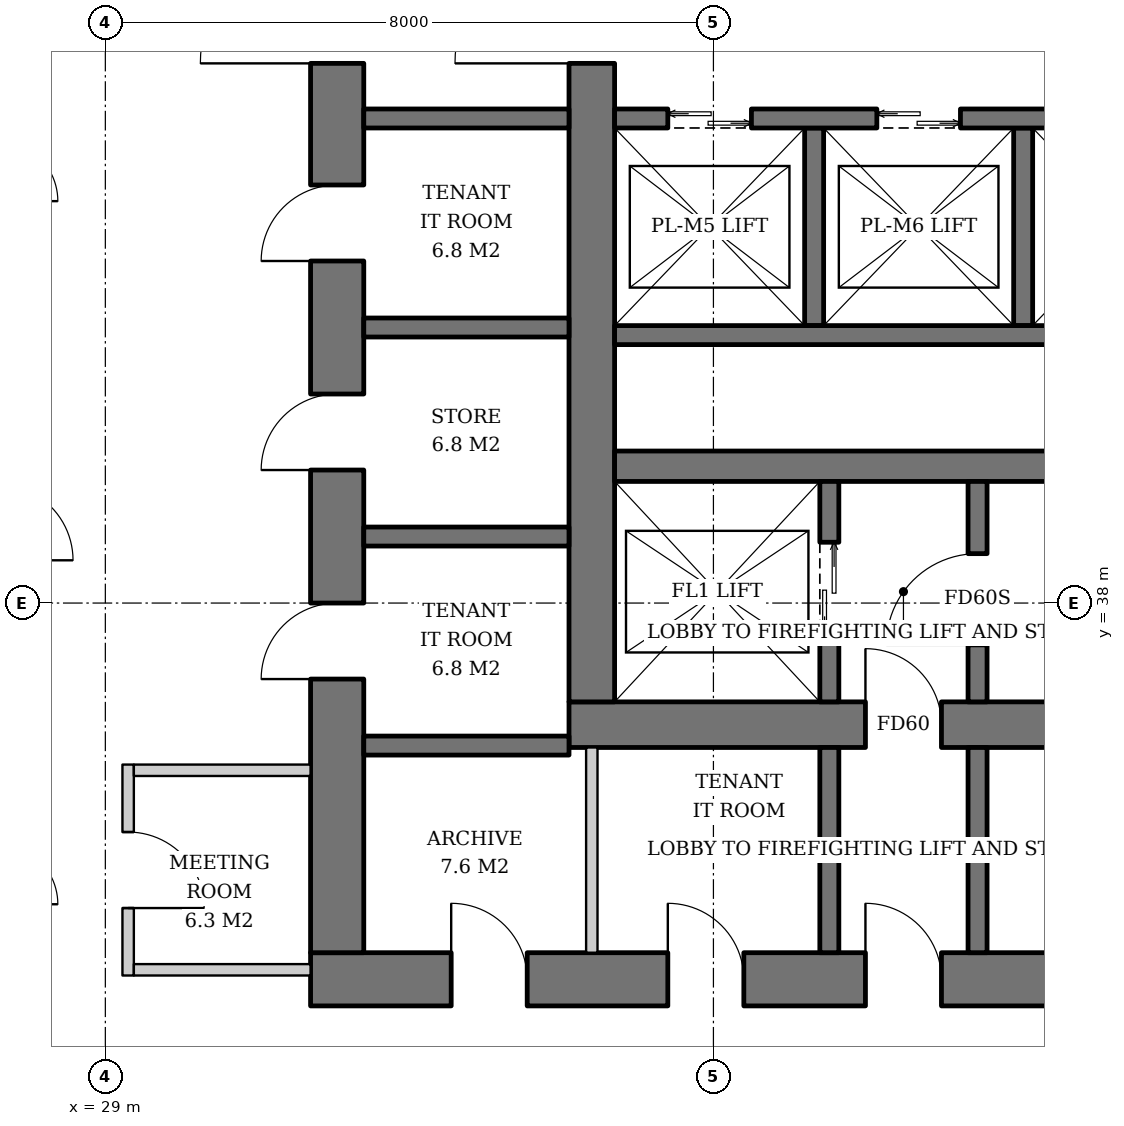
"""IFC4 building model, lengths in metres.
Left out: names, types, materials, properties, quantities, classifications, styles, units other than length and angle.
Written with IfcOpenShell. Run it as: python <this file> out.ifc"""

import sys

from ifc_helpers import new_model, si_unit, direction, frame, frame_2d, origin, place, context, subcontext, project, spatial, rectangle, extrude, element, fill, save


model = new_model("IFC4")
c1 = context("Model", 3, precision=1e-05, world=origin(), true_north=direction((0.0, 1.0)))
c2 = subcontext(c1, "Body", "Model", "MODEL_VIEW")
j1 = project(units=[si_unit("LENGTHUNIT", "METRE"), si_unit("PLANEANGLEUNIT", "RADIAN")], contexts=[c1])
p1 = place(None, origin())
s1 = spatial("IfcSite", under=j1, at=p1, CompositionType="ELEMENT")
p2 = place(p1, origin())
s2 = spatial("IfcBuilding", under=s1, at=p2, CompositionType="ELEMENT")
p3 = place(p2, frame((0.0, 0.0, 142.6)))
s3 = spatial("IfcBuildingStorey", under=s2, at=p3, CompositionType="ELEMENT", Elevation=142.6)
p4 = place(p3, frame((35.1, 36.4, 0.0), z_axis=(0.0, 0.0, 1.0), x_axis=(1.0, 0.0, 0.0)))
e1 = element("IfcWall", 1, at=p4, inside=s3, PredefinedType="SHEAR", context=c2, shape_type="SweptSolid", body=[
    extrude(rectangle(XDim=19.8, YDim=0.6, at=frame_2d((9.9, 0.0))), origin(), (0.0, 0.0, 1.0), 3.8),
])
p5 = place(p4, frame((3.9, 0.0, 0.0)))
e2 = element("IfcOpeningElement", 2, at=p5, cuts=e1, PredefinedType="OPENING", context=c2, shape_type="SweptSolid", body=[
    extrude(rectangle(XDim=1.0, YDim=2.1, at=frame_2d((0.5, 1.05))), frame((0.0, 0.31, 0.0), z_axis=(0.0, -1.0, 0.0), x_axis=(1.0, 0.0, 0.0)), (0.0, 0.0, 1.0), 0.62),
])
p6 = place(p4, frame((15.35, 0.0, 0.0)))
e3 = element("IfcOpeningElement", 3, at=p6, cuts=e1, PredefinedType="OPENING", context=c2, shape_type="SweptSolid", body=[
    extrude(rectangle(XDim=1.0, YDim=2.1, at=frame_2d((0.5, 1.05))), frame((0.0, 0.31, 0.0), z_axis=(0.0, -1.0, 0.0), x_axis=(1.0, 0.0, 0.0)), (0.0, 0.0, 1.0), 0.62),
])
p7 = place(p3, frame((35.4, 36.7, 0.0), z_axis=(0.0, 0.0, 1.0), x_axis=(0.0, 1.0, 0.0)))
e4 = element("IfcWall", 4, at=p7, inside=s3, PredefinedType="SHEAR", context=c2, shape_type="SweptSolid", body=[
    extrude(rectangle(XDim=18.6, YDim=0.6, at=frame_2d((9.3, 0.0))), origin(), (0.0, 0.0, 1.0), 3.8),
])
p8 = place(p7, frame((8.4, 0.0, 0.0)))
e5 = element("IfcOpeningElement", 5, at=p8, cuts=e4, PredefinedType="OPENING", context=c2, shape_type="SweptSolid", body=[
    extrude(rectangle(XDim=1.8, YDim=2.4, at=frame_2d((0.9, 1.2))), frame((0.0, 0.31, 0.0), z_axis=(0.0, -1.0, 0.0), x_axis=(1.0, 0.0, 0.0)), (0.0, 0.0, 1.0), 0.62),
])
p9 = place(p3, frame((31.7, 33.05, 0.0), z_axis=(0.0, 0.0, 1.0), x_axis=(1.0, 0.0, 0.0)))
e6 = element("IfcWall", 6, at=p9, inside=s3, PredefinedType="SHEAR", context=c2, shape_type="SweptSolid", body=[
    extrude(rectangle(XDim=26.6, YDim=0.7, at=frame_2d((13.3, 0.0))), origin(), (0.0, 0.0, 1.0), 3.8),
])
p10 = place(p9, frame((7.3, 0.0, 0.0)))
e7 = element("IfcOpeningElement", 7, at=p10, cuts=e6, PredefinedType="OPENING", context=c2, shape_type="SweptSolid", body=[
    extrude(rectangle(XDim=1.0, YDim=2.1, at=frame_2d((0.5, 1.05))), frame((0.0, 0.36, 0.0), z_axis=(0.0, -1.0, 0.0), x_axis=(1.0, 0.0, 0.0)), (0.0, 0.0, 1.0), 0.72),
])
p11 = place(p9, frame((18.75, 0.0, 0.0)))
e8 = element("IfcOpeningElement", 8, at=p11, cuts=e6, PredefinedType="OPENING", context=c2, shape_type="SweptSolid", body=[
    extrude(rectangle(XDim=1.0, YDim=2.1, at=frame_2d((0.5, 1.05))), frame((0.0, 0.36, 0.0), z_axis=(0.0, -1.0, 0.0), x_axis=(1.0, 0.0, 0.0)), (0.0, 0.0, 1.0), 0.72),
])
p12 = place(p9, frame((1.85, 0.0, 0.0)))
e9 = element("IfcOpeningElement", 9, at=p12, cuts=e6, PredefinedType="OPENING", context=c2, shape_type="SweptSolid", body=[
    extrude(rectangle(XDim=1.0, YDim=2.1, at=frame_2d((0.5, 1.05))), frame((0.0, 0.36, 0.0), z_axis=(0.0, -1.0, 0.0), x_axis=(1.0, 0.0, 0.0)), (0.0, 0.0, 1.0), 0.72),
])
p13 = place(p9, frame((4.7, 0.0, 0.0)))
e10 = element("IfcOpeningElement", 10, at=p13, cuts=e6, PredefinedType="OPENING", context=c2, shape_type="SweptSolid", body=[
    extrude(rectangle(XDim=1.0, YDim=2.1, at=frame_2d((0.5, 1.05))), frame((0.0, 0.36, 0.0), z_axis=(0.0, -1.0, 0.0), x_axis=(1.0, 0.0, 0.0)), (0.0, 0.0, 1.0), 0.72),
])
p14 = place(p9, frame((12.44, 0.0, 0.0)))
e11 = element("IfcOpeningElement", 11, at=p14, cuts=e6, PredefinedType="OPENING", context=c2, shape_type="SweptSolid", body=[
    extrude(rectangle(XDim=1.0, YDim=2.1, at=frame_2d((0.5, 1.05))), frame((0.0, 0.36, 0.0), z_axis=(0.0, -1.0, 0.0), x_axis=(1.0, 0.0, 0.0)), (0.0, 0.0, 1.0), 0.72),
])
p15 = place(p9, frame((20.644, 0.0, 0.0)))
e12 = element("IfcOpeningElement", 12, at=p15, cuts=e6, PredefinedType="OPENING", context=c2, shape_type="SweptSolid", body=[
    extrude(rectangle(XDim=1.0, YDim=2.1, at=frame_2d((0.5, 1.05))), frame((0.0, 0.36, 0.0), z_axis=(0.0, -1.0, 0.0), x_axis=(1.0, 0.0, 0.0)), (0.0, 0.0, 1.0), 0.72),
])
p16 = place(p9, frame((23.544, 0.0, 0.0)))
e13 = element("IfcOpeningElement", 13, at=p16, cuts=e6, PredefinedType="OPENING", context=c2, shape_type="SweptSolid", body=[
    extrude(rectangle(XDim=1.0, YDim=2.1, at=frame_2d((0.5, 1.05))), frame((0.0, 0.36, 0.0), z_axis=(0.0, -1.0, 0.0), x_axis=(1.0, 0.0, 0.0)), (0.0, 0.0, 1.0), 0.72),
])
p17 = place(p3, frame((32.05, 33.4, 0.0), z_axis=(0.0, 0.0, 1.0), x_axis=(0.0, 1.0, 0.0)))
e14 = element("IfcWall", 14, at=p17, inside=s3, PredefinedType="SHEAR", context=c2, shape_type="SweptSolid", body=[
    extrude(rectangle(XDim=25.2, YDim=0.7, at=frame_2d((12.6, 0.0))), origin(), (0.0, 0.0, 1.0), 3.8),
])
p18 = place(p17, frame((11.7, 0.0, 0.0)))
e15 = element("IfcOpeningElement", 15, at=p18, cuts=e14, PredefinedType="OPENING", context=c2, shape_type="SweptSolid", body=[
    extrude(rectangle(XDim=1.8, YDim=2.4, at=frame_2d((0.9, 1.2))), frame((0.0, 0.36, 0.0), z_axis=(0.0, -1.0, 0.0), x_axis=(1.0, 0.0, 0.0)), (0.0, 0.0, 1.0), 0.72),
])
p19 = place(p17, frame((3.6, 0.0, 0.0)))
e16 = element("IfcOpeningElement", 16, at=p19, cuts=e14, PredefinedType="OPENING", context=c2, shape_type="SweptSolid", body=[
    extrude(rectangle(XDim=1.0, YDim=2.1, at=frame_2d((0.5, 1.05))), frame((0.0, 0.36, 0.0), z_axis=(0.0, -1.0, 0.0), x_axis=(1.0, 0.0, 0.0)), (0.0, 0.0, 1.0), 0.72),
])
p20 = place(p17, frame((6.35, 0.0, 0.0)))
e17 = element("IfcOpeningElement", 17, at=p20, cuts=e14, PredefinedType="OPENING", context=c2, shape_type="SweptSolid", body=[
    extrude(rectangle(XDim=1.0, YDim=2.1, at=frame_2d((0.5, 1.05))), frame((0.0, 0.36, 0.0), z_axis=(0.0, -1.0, 0.0), x_axis=(1.0, 0.0, 0.0)), (0.0, 0.0, 1.0), 0.72),
])
p21 = place(p17, frame((9.1, 0.0, 0.0)))
e18 = element("IfcOpeningElement", 18, at=p21, cuts=e14, PredefinedType="OPENING", context=c2, shape_type="SweptSolid", body=[
    extrude(rectangle(XDim=1.0, YDim=2.1, at=frame_2d((0.5, 1.05))), frame((0.0, 0.36, 0.0), z_axis=(0.0, -1.0, 0.0), x_axis=(1.0, 0.0, 0.0)), (0.0, 0.0, 1.0), 0.72),
])
p22 = place(p17, frame((15.1, 0.0, 0.0)))
e19 = element("IfcOpeningElement", 19, at=p22, cuts=e14, PredefinedType="OPENING", context=c2, shape_type="SweptSolid", body=[
    extrude(rectangle(XDim=1.0, YDim=2.1, at=frame_2d((0.5, 1.05))), frame((0.0, 0.36, 0.0), z_axis=(0.0, -1.0, 0.0), x_axis=(1.0, 0.0, 0.0)), (0.0, 0.0, 1.0), 0.72),
])
p23 = place(p17, frame((17.85, 0.0, 0.0)))
e20 = element("IfcOpeningElement", 20, at=p23, cuts=e14, PredefinedType="OPENING", context=c2, shape_type="SweptSolid", body=[
    extrude(rectangle(XDim=1.0, YDim=2.1, at=frame_2d((0.5, 1.05))), frame((0.0, 0.36, 0.0), z_axis=(0.0, -1.0, 0.0), x_axis=(1.0, 0.0, 0.0)), (0.0, 0.0, 1.0), 0.72),
])
p24 = place(p3, frame((35.7, 39.8, 0.0), z_axis=(0.0, 0.0, 1.0), x_axis=(1.0, 0.0, 0.0)))
e21 = element("IfcWall", 21, at=p24, inside=s3, PredefinedType="SHEAR", context=c2, shape_type="SweptSolid", body=[
    extrude(rectangle(XDim=18.6, YDim=0.4, at=frame_2d((9.3, 0.0))), origin(), (0.0, 0.0, 1.0), 3.8),
])
p25 = place(p3, frame((38.525, 36.7, 0.0), z_axis=(0.0, 0.0, 1.0), x_axis=(0.0, 1.0, 0.0)))
e22 = element("IfcWall", 22, at=p25, inside=s3, PredefinedType="SHEAR", context=c2, shape_type="SweptSolid", body=[
    extrude(rectangle(XDim=2.9, YDim=0.25, at=frame_2d((1.45, 0.0))), origin(), (0.0, 0.0, 1.0), 3.8),
])
p26 = place(p25, frame((0.8, 0.0, 0.0)))
e23 = element("IfcOpeningElement", 23, at=p26, cuts=e22, PredefinedType="OPENING", context=c2, shape_type="SweptSolid", body=[
    extrude(rectangle(XDim=1.3, YDim=2.2, at=frame_2d((0.65, 1.1))), frame((0.0, 0.135, 0.0), z_axis=(0.0, -1.0, 0.0), x_axis=(1.0, 0.0, 0.0)), (0.0, 0.0, 1.0), 0.27),
])
p27 = place(p3, frame((40.475, 36.7, 0.0), z_axis=(0.0, 0.0, 1.0), x_axis=(0.0, 1.0, 0.0)))
e24 = element("IfcWall", 24, at=p27, inside=s3, PredefinedType="SHEAR", context=c2, shape_type="SweptSolid", body=[
    extrude(rectangle(XDim=2.9, YDim=0.25, at=frame_2d((1.45, 0.0))), origin(), (0.0, 0.0, 1.0), 3.8),
])
p28 = place(p27, frame((0.75, 0.0, 0.0)))
e25 = element("IfcOpeningElement", 25, at=p28, cuts=e24, PredefinedType="OPENING", context=c2, shape_type="SweptSolid", body=[
    extrude(rectangle(XDim=1.2, YDim=2.1, at=frame_2d((0.6, 1.05))), frame((0.0, 0.135, 0.0), z_axis=(0.0, -1.0, 0.0), x_axis=(1.0, 0.0, 0.0)), (0.0, 0.0, 1.0), 0.27),
])
for number, where, z_axis, x_axis in (
    (26, (38.325, 44.25, 0.0), (0.0, 0.0, 1.0), (0.0, -1.0, 0.0)),
    (27, (41.075, 44.25, 0.0), (0.0, 0.0, 1.0), (0.0, -1.0, 0.0)),
):
    element("IfcWall", number, at=place(p3, frame(where, z_axis=z_axis, x_axis=x_axis)), inside=s3, PredefinedType="SHEAR", context=c2, shape_type="SweptSolid", body=[
        extrude(rectangle(XDim=2.6, YDim=0.25, at=frame_2d((1.3, 0.0))), origin(), (0.0, 0.0, 1.0), 3.8),
    ])
p29 = place(p3, frame((35.7, 41.525, 0.0), z_axis=(0.0, 0.0, 1.0), x_axis=(1.0, 0.0, 0.0)))
e28 = element("IfcWall", 28, at=p29, inside=s3, PredefinedType="SHEAR", context=c2, shape_type="SweptSolid", body=[
    extrude(rectangle(XDim=11.0, YDim=0.25, at=frame_2d((5.5, 0.0))), origin(), (0.0, 0.0, 1.0), 3.8),
])
p30 = place(p3, frame((35.7, 44.375, 0.0), z_axis=(0.0, 0.0, 1.0), x_axis=(1.0, 0.0, 0.0)))
e29 = element("IfcWall", 29, at=p30, inside=s3, PredefinedType="SHEAR", context=c2, shape_type="SweptSolid", body=[
    extrude(rectangle(XDim=12.83, YDim=0.25, at=frame_2d((6.415, 0.0))), origin(), (0.0, 0.0, 1.0), 3.8),
])
p31 = place(p30, frame((0.7, 0.0, 0.0)))
e30 = element("IfcOpeningElement", 30, at=p31, cuts=e29, PredefinedType="OPENING", context=c2, shape_type="SweptSolid", body=[
    extrude(rectangle(XDim=1.1, YDim=2.2, at=frame_2d((0.55, 1.1))), frame((0.0, 0.135, 0.0), z_axis=(0.0, -1.0, 0.0), x_axis=(1.0, 0.0, 0.0)), (0.0, 0.0, 1.0), 0.27),
])
p32 = place(p30, frame((3.45, 0.0, 0.0)))
e31 = element("IfcOpeningElement", 31, at=p32, cuts=e29, PredefinedType="OPENING", context=c2, shape_type="SweptSolid", body=[
    extrude(rectangle(XDim=1.1, YDim=2.2, at=frame_2d((0.55, 1.1))), frame((0.0, 0.135, 0.0), z_axis=(0.0, -1.0, 0.0), x_axis=(1.0, 0.0, 0.0)), (0.0, 0.0, 1.0), 0.27),
])
p33 = place(p30, frame((6.2, 0.0, 0.0)))
e32 = element("IfcOpeningElement", 32, at=p33, cuts=e29, PredefinedType="OPENING", context=c2, shape_type="SweptSolid", body=[
    extrude(rectangle(XDim=1.1, YDim=2.2, at=frame_2d((0.55, 1.1))), frame((0.0, 0.135, 0.0), z_axis=(0.0, -1.0, 0.0), x_axis=(1.0, 0.0, 0.0)), (0.0, 0.0, 1.0), 0.27),
])
p34 = place(p30, frame((8.95, 0.0, 0.0)))
e33 = element("IfcOpeningElement", 33, at=p34, cuts=e29, PredefinedType="OPENING", context=c2, shape_type="SweptSolid", body=[
    extrude(rectangle(XDim=1.1, YDim=2.2, at=frame_2d((0.55, 1.1))), frame((0.0, 0.135, 0.0), z_axis=(0.0, -1.0, 0.0), x_axis=(1.0, 0.0, 0.0)), (0.0, 0.0, 1.0), 0.27),
])
p35 = place(p30, frame((11.515, 0.0, 0.0)))
e34 = element("IfcOpeningElement", 34, at=p35, cuts=e29, PredefinedType="OPENING", context=c2, shape_type="SweptSolid", body=[
    extrude(rectangle(XDim=0.8, YDim=2.0, at=frame_2d((0.4, 1.0))), frame((0.0, 0.135, 0.0), z_axis=(0.0, -1.0, 0.0), x_axis=(1.0, 0.0, 0.0)), (0.0, 0.0, 1.0), 0.27),
])
for number, where, z_axis, x_axis in (
    (35, (32.4, 36.125, 0.0), (0.0, 0.0, 1.0), (1.0, 0.0, 0.0)),
    (36, (32.4, 38.875, 0.0), (0.0, 0.0, 1.0), (1.0, 0.0, 0.0)),
    (37, (32.4, 41.625, 0.0), (0.0, 0.0, 1.0), (1.0, 0.0, 0.0)),
    (38, (32.4, 44.375, 0.0), (0.0, 0.0, 1.0), (1.0, 0.0, 0.0)),
):
    element("IfcWall", number, at=place(p3, frame(where, z_axis=z_axis, x_axis=x_axis)), inside=s3, PredefinedType="SHEAR", context=c2, shape_type="SweptSolid", body=[
        extrude(rectangle(XDim=2.7, YDim=0.25, at=frame_2d((1.35, 0.0))), origin(), (0.0, 0.0, 1.0), 3.8),
    ])
for number, where, z_axis, x_axis in (
    (39, (38.525, 33.4, 0.0), (0.0, 0.0, 1.0), (0.0, 1.0, 0.0)),
    (40, (40.475, 33.4, 0.0), (0.0, 0.0, 1.0), (0.0, 1.0, 0.0)),
):
    element("IfcWall", number, at=place(p3, frame(where, z_axis=z_axis, x_axis=x_axis)), inside=s3, PredefinedType="SOLIDWALL", context=c2, shape_type="SweptSolid", body=[
        extrude(rectangle(XDim=2.7, YDim=0.25, at=frame_2d((1.35, 0.0))), origin(), (0.0, 0.0, 1.0), 3.62),
    ])
p36 = place(p3, frame((35.4, 33.4, 0.0), z_axis=(0.0, 0.0, 1.0), x_axis=(0.0, 1.0, 0.0)))
e41 = element("IfcWall", 41, at=p36, inside=s3, PredefinedType="SOLIDWALL", context=c2, shape_type="SweptSolid", body=[
    extrude(rectangle(XDim=2.7, YDim=0.15, at=frame_2d((1.35, 0.0))), origin(), (0.0, 0.0, 1.0), 3.62),
])
p37 = place(p3, frame((29.3, 35.875, 0.0), z_axis=(0.0, 0.0, 1.0), x_axis=(0.0, -1.0, 0.0)))
e42 = element("IfcWall", 42, at=p37, inside=s3, PredefinedType="PARTITIONING", context=c2, shape_type="SweptSolid", body=[
    extrude(rectangle(XDim=2.775, YDim=0.15, at=frame_2d((1.387, 0.0))), origin(), (0.0, 0.0, 1.0), 2.806),
])
p38 = place(p37, frame((0.887, 0.0, 0.0)))
e43 = element("IfcOpeningElement", 43, at=p38, cuts=e42, PredefinedType="OPENING", context=c2, shape_type="SweptSolid", body=[
    extrude(rectangle(XDim=1.0, YDim=2.1, at=frame_2d((0.5, 1.05))), frame((0.0, 0.085, 0.0), z_axis=(0.0, -1.0, 0.0), x_axis=(1.0, 0.0, 0.0)), (0.0, 0.0, 1.0), 0.17),
])
for number, where, z_axis, x_axis in (
    (44, (31.7, 35.8, 0.0), (0.0, 0.0, 1.0), (-1.0, 0.0, 0.0)),
    (45, (31.7, 33.175, 0.0), (0.0, 0.0, 1.0), (-1.0, 0.0, 0.0)),
):
    element("IfcWall", number, at=place(p3, frame(where, z_axis=z_axis, x_axis=x_axis)), inside=s3, PredefinedType="PARTITIONING", context=c2, shape_type="SweptSolid", body=[
        extrude(rectangle(XDim=2.325, YDim=0.15, at=frame_2d((1.163, 0.0))), origin(), (0.0, 0.0, 1.0), 3.62),
    ])
p39 = place(p26, origin())
e46 = element("IfcDoor", 46, at=p39, inside=s3, OperationType="DOUBLE_DOOR_SLIDING", PredefinedType="DOOR", context=c2, shape_type="SweptSolid", body=[
    extrude(rectangle(XDim=1.3, YDim=2.2, at=frame_2d((0.65, 1.1))), frame((0.0, 0.025, 0.0), z_axis=(0.0, -1.0, 0.0), x_axis=(1.0, 0.0, 0.0)), (0.0, 0.0, 1.0), 0.05),
])
fill(e23, e46)
p40 = place(p28, origin())
e47 = element("IfcDoor", 47, at=p40, inside=s3, OperationType="SINGLE_SWING_LEFT", PredefinedType="DOOR", context=c2, shape_type="SweptSolid", body=[
    extrude(rectangle(XDim=1.2, YDim=2.1, at=frame_2d((0.6, 1.05))), frame((0.0, 0.025, 0.0), z_axis=(0.0, -1.0, 0.0), x_axis=(1.0, 0.0, 0.0)), (0.0, 0.0, 1.0), 0.05),
])
fill(e25, e47)
p41 = place(p31, origin())
e48 = element("IfcDoor", 48, at=p41, inside=s3, OperationType="DOUBLE_DOOR_SLIDING", PredefinedType="DOOR", context=c2, shape_type="SweptSolid", body=[
    extrude(rectangle(XDim=1.1, YDim=2.2, at=frame_2d((0.55, 1.1))), frame((0.0, 0.025, 0.0), z_axis=(0.0, -1.0, 0.0), x_axis=(1.0, 0.0, 0.0)), (0.0, 0.0, 1.0), 0.05),
])
fill(e30, e48)
p42 = place(p32, origin())
e49 = element("IfcDoor", 49, at=p42, inside=s3, OperationType="DOUBLE_DOOR_SLIDING", PredefinedType="DOOR", context=c2, shape_type="SweptSolid", body=[
    extrude(rectangle(XDim=1.1, YDim=2.2, at=frame_2d((0.55, 1.1))), frame((0.0, 0.025, 0.0), z_axis=(0.0, -1.0, 0.0), x_axis=(1.0, 0.0, 0.0)), (0.0, 0.0, 1.0), 0.05),
])
fill(e31, e49)
p43 = place(p5, origin())
e50 = element("IfcDoor", 50, at=p43, inside=s3, OperationType="SINGLE_SWING_LEFT", PredefinedType="DOOR", context=c2, shape_type="SweptSolid", body=[
    extrude(rectangle(XDim=1.0, YDim=2.1, at=frame_2d((0.5, 1.05))), frame((0.0, 0.025, 0.0), z_axis=(0.0, -1.0, 0.0), x_axis=(1.0, 0.0, 0.0)), (0.0, 0.0, 1.0), 0.05),
])
fill(e2, e50)
p44 = place(p8, origin())
e51 = element("IfcDoor", 51, at=p44, inside=s3, OperationType="DOUBLE_DOOR_SINGLE_SWING", PredefinedType="DOOR", context=c2, shape_type="SweptSolid", body=[
    extrude(rectangle(XDim=1.8, YDim=2.4, at=frame_2d((0.9, 1.2))), frame((0.0, 0.025, 0.0), z_axis=(0.0, -1.0, 0.0), x_axis=(1.0, 0.0, 0.0)), (0.0, 0.0, 1.0), 0.05),
])
fill(e5, e51)
p45 = place(p18, origin())
e52 = element("IfcDoor", 52, at=p45, inside=s3, OperationType="DOUBLE_DOOR_SINGLE_SWING", PredefinedType="DOOR", context=c2, shape_type="SweptSolid", body=[
    extrude(rectangle(XDim=1.8, YDim=2.4, at=frame_2d((0.9, 1.2))), frame((0.0, 0.025, 0.0), z_axis=(0.0, -1.0, 0.0), x_axis=(1.0, 0.0, 0.0)), (0.0, 0.0, 1.0), 0.05),
])
fill(e15, e52)
p46 = place(p10, origin())
e53 = element("IfcDoor", 53, at=p46, inside=s3, OperationType="SINGLE_SWING_LEFT", PredefinedType="DOOR", context=c2, shape_type="SweptSolid", body=[
    extrude(rectangle(XDim=1.0, YDim=2.1, at=frame_2d((0.5, 1.05))), frame((0.0, 0.025, 0.0), z_axis=(0.0, -1.0, 0.0), x_axis=(1.0, 0.0, 0.0)), (0.0, 0.0, 1.0), 0.05),
])
fill(e7, e53)
p47 = place(p19, origin())
e54 = element("IfcDoor", 54, at=p47, inside=s3, OperationType="SINGLE_SWING_LEFT", PredefinedType="DOOR", context=c2, shape_type="SweptSolid", body=[
    extrude(rectangle(XDim=1.0, YDim=2.1, at=frame_2d((0.5, 1.05))), frame((0.0, -0.29, 0.0), z_axis=(0.0, -1.0, 0.0), x_axis=(1.0, 0.0, 0.0)), (0.0, 0.0, 1.0), 0.05),
])
fill(e16, e54)
p48 = place(p20, origin())
e55 = element("IfcDoor", 55, at=p48, inside=s3, OperationType="SINGLE_SWING_LEFT", PredefinedType="DOOR", context=c2, shape_type="SweptSolid", body=[
    extrude(rectangle(XDim=1.0, YDim=2.1, at=frame_2d((0.5, 1.05))), frame((0.0, -0.29, 0.0), z_axis=(0.0, -1.0, 0.0), x_axis=(1.0, 0.0, 0.0)), (0.0, 0.0, 1.0), 0.05),
])
fill(e17, e55)
p49 = place(p21, origin())
e56 = element("IfcDoor", 56, at=p49, inside=s3, OperationType="SINGLE_SWING_LEFT", PredefinedType="DOOR", context=c2, shape_type="SweptSolid", body=[
    extrude(rectangle(XDim=1.0, YDim=2.1, at=frame_2d((0.5, 1.05))), frame((0.0, -0.29, 0.0), z_axis=(0.0, -1.0, 0.0), x_axis=(1.0, 0.0, 0.0)), (0.0, 0.0, 1.0), 0.05),
])
fill(e18, e56)
p50 = place(p12, origin())
e57 = element("IfcDoor", 57, at=p50, inside=s3, OperationType="SINGLE_SWING_LEFT", PredefinedType="DOOR", context=c2, shape_type="SweptSolid", body=[
    extrude(rectangle(XDim=1.0, YDim=2.1, at=frame_2d((0.5, 1.05))), frame((0.0, 0.34, 0.0), z_axis=(0.0, -1.0, 0.0), x_axis=(1.0, 0.0, 0.0)), (0.0, 0.0, 1.0), 0.05),
])
fill(e9, e57)
p51 = place(p13, origin())
e58 = element("IfcDoor", 58, at=p51, inside=s3, OperationType="SINGLE_SWING_LEFT", PredefinedType="DOOR", context=c2, shape_type="SweptSolid", body=[
    extrude(rectangle(XDim=1.0, YDim=2.1, at=frame_2d((0.5, 1.05))), frame((0.0, 0.34, 0.0), z_axis=(0.0, -1.0, 0.0), x_axis=(1.0, 0.0, 0.0)), (0.0, 0.0, 1.0), 0.05),
])
fill(e10, e58)
p52 = place(p38, origin())
e59 = element("IfcDoor", 59, at=p52, inside=s3, OperationType="SINGLE_SWING_RIGHT", PredefinedType="DOOR", context=c2, shape_type="SweptSolid", body=[
    extrude(rectangle(XDim=1.0, YDim=2.1, at=frame_2d((0.5, 1.05))), frame((0.0, 0.025, 0.0), z_axis=(0.0, -1.0, 0.0), x_axis=(1.0, 0.0, 0.0)), (0.0, 0.0, 1.0), 0.05),
])
fill(e43, e59)
save(model, sys.argv[1])
